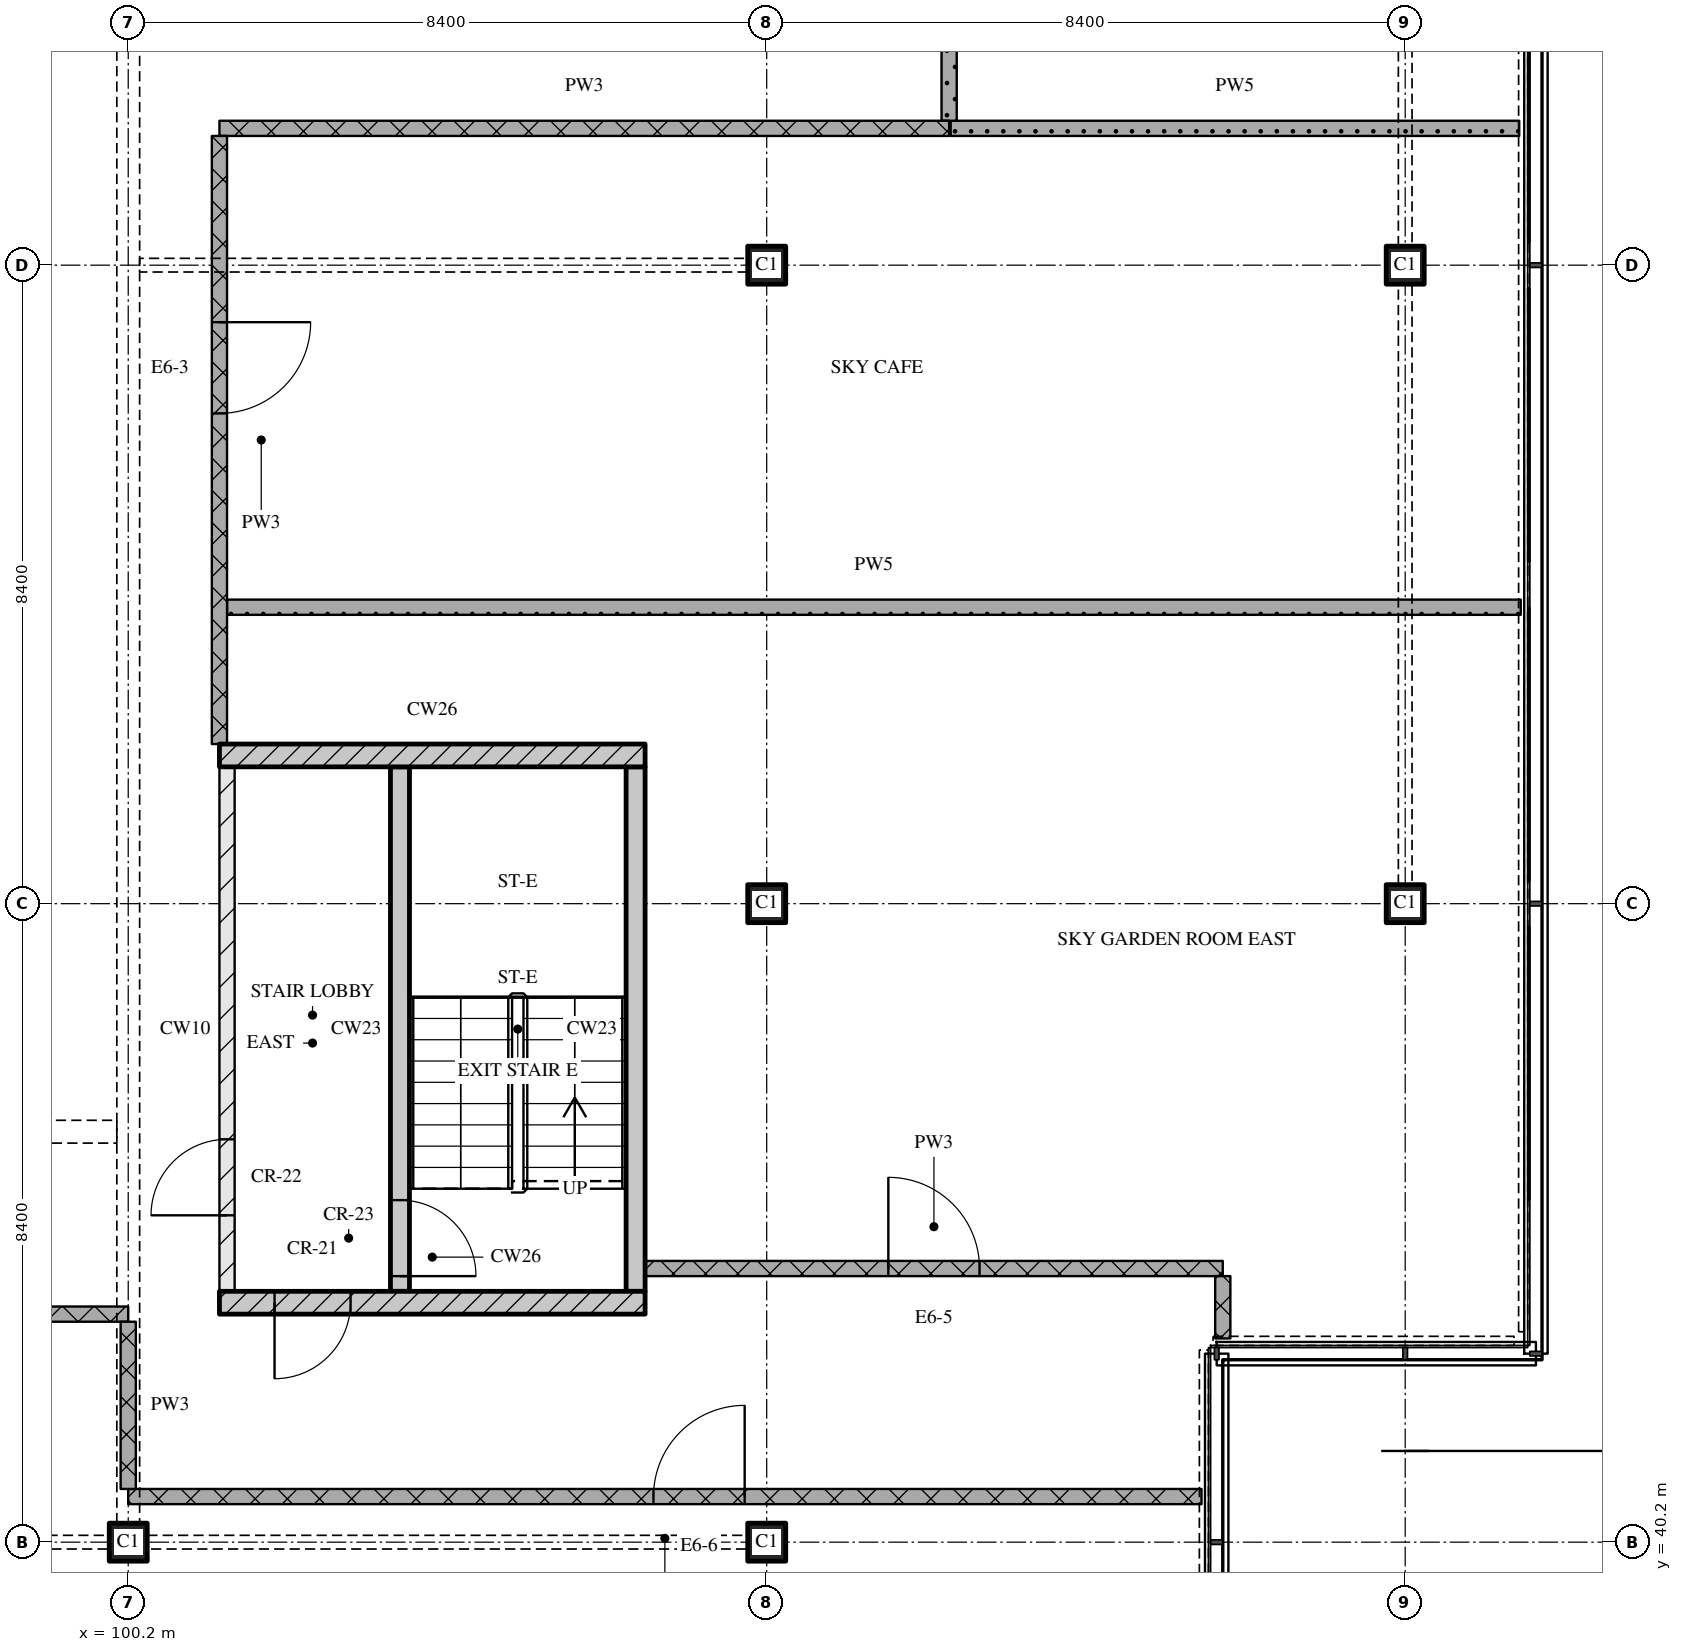
"""IFC4 building model, lengths in metres.
Left out: names, types, materials, properties, quantities, classifications, styles, units other than length and angle.
Written with IfcOpenShell. Run it as: python <this file> out.ifc"""

import sys

from ifc_helpers import new_model, si_unit, direction, frame, frame_2d, origin, origin_2d, place, context, subcontext, project, spatial, rectangle, extrude, element, fill, save


model = new_model("IFC4")
c1 = context("Model", 3, precision=1e-05, world=origin(), true_north=direction((0.0, 1.0)))
c2 = subcontext(c1, "Body", "Model", "MODEL_VIEW")
j1 = project(units=[si_unit("LENGTHUNIT", "METRE"), si_unit("PLANEANGLEUNIT", "RADIAN")], contexts=[c1])
p1 = place(None, origin())
s1 = spatial("IfcSite", under=j1, at=p1, CompositionType="ELEMENT")
p2 = place(p1, origin())
s2 = spatial("IfcBuilding", under=s1, at=p2, CompositionType="ELEMENT")
p3 = place(p2, frame((0.0, 0.0, 303.15)))
s3 = spatial("IfcBuildingStorey", under=s2, at=p3, CompositionType="ELEMENT", Elevation=303.15)
for number, where, z_axis, x_axis in (
    (1, (100.2, 40.2, 0.0), (0.0, 0.0, 1.0), (1.0, 0.0, 0.0)),
    (2, (108.6, 40.2, 0.0), (0.0, 0.0, 1.0), (1.0, 0.0, 0.0)),
    (3, (108.6, 48.6, 0.0), (0.0, 0.0, 1.0), (1.0, 0.0, 0.0)),
    (4, (108.6, 57.0, 0.0), (0.0, 0.0, 1.0), (1.0, 0.0, 0.0)),
    (5, (117.0, 48.6, 0.0), (0.0, 0.0, 1.0), (1.0, 0.0, 0.0)),
    (6, (117.0, 57.0, 0.0), (0.0, 0.0, 1.0), (1.0, 0.0, 0.0)),
):
    element("IfcColumn", number, at=place(p3, frame(where, z_axis=z_axis, x_axis=x_axis)), inside=s3, PredefinedType="COLUMN", context=c2, shape_type="SweptSolid", body=[
        extrude(rectangle(XDim=0.5, YDim=0.5, at=origin_2d()), origin(), (0.0, 0.0, 1.0), 3.6),
    ])
p4 = place(p3, frame((101.4, 43.35, 0.0), z_axis=(0.0, 0.0, 1.0), x_axis=(1.0, 0.0, 0.0)))
e7 = element("IfcWall", 7, at=p4, inside=s3, PredefinedType="SOLIDWALL", context=c2, shape_type="SweptSolid", body=[
    extrude(rectangle(XDim=5.6, YDim=0.3, at=frame_2d((2.8, 0.0))), origin(), (0.0, 0.0, 1.0), 3.32),
])
p5 = place(p4, frame((0.725, 0.0, 0.0)))
e8 = element("IfcOpeningElement", 8, at=p5, cuts=e7, PredefinedType="OPENING", context=c2, shape_type="SweptSolid", body=[
    extrude(rectangle(XDim=1.0, YDim=2.1, at=frame_2d((0.5, 1.05))), frame((0.0, 0.16, 0.0), z_axis=(0.0, -1.0, 0.0), x_axis=(1.0, 0.0, 0.0)), (0.0, 0.0, 1.0), 0.32),
])
p6 = place(p3, frame((101.5, 43.5, 0.0), z_axis=(0.0, 0.0, 1.0), x_axis=(0.0, 1.0, 0.0)))
e9 = element("IfcWall", 9, at=p6, inside=s3, PredefinedType="PARTITIONING", context=c2, shape_type="SweptSolid", body=[
    extrude(rectangle(XDim=6.9, YDim=0.2, at=frame_2d((3.45, 0.0))), origin(), (0.0, 0.0, 1.0), 3.32),
])
p7 = place(p6, frame((1.0, 0.0, 0.0)))
e10 = element("IfcOpeningElement", 10, at=p7, cuts=e9, PredefinedType="OPENING", context=c2, shape_type="SweptSolid", body=[
    extrude(rectangle(XDim=1.0, YDim=2.1, at=frame_2d((0.5, 1.05))), frame((0.0, 0.11, 0.0), z_axis=(0.0, -1.0, 0.0), x_axis=(1.0, 0.0, 0.0)), (0.0, 0.0, 1.0), 0.22),
])
p8 = place(p3, frame((103.775, 43.5, 0.0), z_axis=(0.0, 0.0, 1.0), x_axis=(0.0, 1.0, 0.0)))
e11 = element("IfcWall", 11, at=p8, inside=s3, PredefinedType="SOLIDWALL", context=c2, shape_type="SweptSolid", body=[
    extrude(rectangle(XDim=6.9, YDim=0.25, at=frame_2d((3.45, 0.0))), origin(), (0.0, 0.0, 1.0), 3.32),
])
p9 = place(p8, frame((0.2, 0.0, 0.0)))
e12 = element("IfcOpeningElement", 12, at=p9, cuts=e11, PredefinedType="OPENING", context=c2, shape_type="SweptSolid", body=[
    extrude(rectangle(XDim=1.0, YDim=2.1, at=frame_2d((0.5, 1.05))), frame((0.0, 0.135, 0.0), z_axis=(0.0, -1.0, 0.0), x_axis=(1.0, 0.0, 0.0)), (0.0, 0.0, 1.0), 0.27),
])
p10 = place(p3, frame((106.875, 43.5, 0.0), z_axis=(0.0, 0.0, 1.0), x_axis=(0.0, 1.0, 0.0)))
e13 = element("IfcWall", 13, at=p10, inside=s3, PredefinedType="SOLIDWALL", context=c2, shape_type="SweptSolid", body=[
    extrude(rectangle(XDim=6.9, YDim=0.25, at=frame_2d((3.45, 0.0))), origin(), (0.0, 0.0, 1.0), 3.32),
])
p11 = place(p3, frame((101.4, 50.55, 0.0), z_axis=(0.0, 0.0, 1.0), x_axis=(1.0, 0.0, 0.0)))
e14 = element("IfcWall", 14, at=p11, inside=s3, PredefinedType="SOLIDWALL", context=c2, shape_type="SweptSolid", body=[
    extrude(rectangle(XDim=5.6, YDim=0.3, at=frame_2d((2.8, 0.0))), origin(), (0.0, 0.0, 1.0), 3.32),
])
p12 = place(p3, frame((114.32, 40.8, 0.0), z_axis=(0.0, 0.0, 1.0), x_axis=(-1.0, 0.0, 0.0)))
e15 = element("IfcWall", 15, at=p12, inside=s3, PredefinedType="PARTITIONING", context=c2, shape_type="SweptSolid", body=[
    extrude(rectangle(XDim=14.12, YDim=0.2, at=frame_2d((7.06, 0.0))), origin(), (0.0, 0.0, 1.0), 3.32),
])
p13 = place(p12, frame((6.01, 0.0, 0.0)))
e16 = element("IfcOpeningElement", 16, at=p13, cuts=e15, PredefinedType="OPENING", context=c2, shape_type="SweptSolid", body=[
    extrude(rectangle(XDim=1.2, YDim=2.1, at=frame_2d((0.6, 1.05))), frame((0.0, 0.11, 0.0), z_axis=(0.0, -1.0, 0.0), x_axis=(1.0, 0.0, 0.0)), (0.0, 0.0, 1.0), 0.22),
])
p14 = place(p3, frame((100.2, 43.2, 0.0), z_axis=(0.0, 0.0, 1.0), x_axis=(-1.0, 0.0, 0.0)))
e17 = element("IfcWall", 17, at=p14, inside=s3, PredefinedType="PARTITIONING", context=c2, shape_type="SweptSolid", body=[
    extrude(rectangle(XDim=25.2, YDim=0.2, at=frame_2d((12.6, 0.0))), origin(), (0.0, 0.0, 1.0), 3.32),
])
p15 = place(p14, frame((12.0, 0.0, 0.0)))
e18 = element("IfcOpeningElement", 18, at=p15, cuts=e17, PredefinedType="OPENING", context=c2, shape_type="SweptSolid", body=[
    extrude(rectangle(XDim=1.2, YDim=2.1, at=frame_2d((0.6, 1.05))), frame((0.0, 0.11, 0.0), z_axis=(0.0, -1.0, 0.0), x_axis=(1.0, 0.0, 0.0)), (0.0, 0.0, 1.0), 0.22),
])
p16 = place(p3, frame((107.0, 43.8, 0.0), z_axis=(0.0, 0.0, 1.0), x_axis=(1.0, 0.0, 0.0)))
e19 = element("IfcWall", 19, at=p16, inside=s3, PredefinedType="PARTITIONING", context=c2, shape_type="SweptSolid", body=[
    extrude(rectangle(XDim=7.6, YDim=0.2, at=frame_2d((3.8, 0.0))), origin(), (0.0, 0.0, 1.0), 3.32),
])
p17 = place(p16, frame((3.2, 0.0, 0.0)))
e20 = element("IfcOpeningElement", 20, at=p17, cuts=e19, PredefinedType="OPENING", context=c2, shape_type="SweptSolid", body=[
    extrude(rectangle(XDim=1.2, YDim=2.1, at=frame_2d((0.6, 1.05))), frame((0.0, 0.11, 0.0), z_axis=(0.0, -1.0, 0.0), x_axis=(1.0, 0.0, 0.0)), (0.0, 0.0, 1.0), 0.22),
])
p18 = place(p3, frame((101.5, 52.5, 0.0), z_axis=(0.0, 0.0, 1.0), x_axis=(1.0, 0.0, 0.0)))
e21 = element("IfcWall", 21, at=p18, inside=s3, PredefinedType="PARTITIONING", context=c2, shape_type="SweptSolid", body=[
    extrude(rectangle(XDim=17.02, YDim=0.2, at=frame_2d((8.51, 0.0))), origin(), (0.0, 0.0, 1.0), 3.32),
])
p19 = place(p3, frame((101.4, 58.8, 0.0), z_axis=(0.0, 0.0, 1.0), x_axis=(1.0, 0.0, 0.0)))
e22 = element("IfcWall", 22, at=p19, inside=s3, PredefinedType="PARTITIONING", context=c2, shape_type="SweptSolid", body=[
    extrude(rectangle(XDim=9.6, YDim=0.2, at=frame_2d((4.8, 0.0))), origin(), (0.0, 0.0, 1.0), 3.32),
])
p20 = place(p3, frame((111.02, 58.8, 0.0), z_axis=(0.0, 0.0, 1.0), x_axis=(1.0, 0.0, 0.0)))
e23 = element("IfcWall", 23, at=p20, inside=s3, PredefinedType="PARTITIONING", context=c2, shape_type="SweptSolid", body=[
    extrude(rectangle(XDim=7.48, YDim=0.2, at=frame_2d((3.74, 0.0))), origin(), (0.0, 0.0, 1.0), 3.32),
])
p21 = place(p3, frame((100.2, 43.1, 0.0), z_axis=(0.0, 0.0, 1.0), x_axis=(0.0, -1.0, 0.0)))
e24 = element("IfcWall", 24, at=p21, inside=s3, PredefinedType="PARTITIONING", context=c2, shape_type="SweptSolid", body=[
    extrude(rectangle(XDim=2.2, YDim=0.2, at=frame_2d((1.1, 0.0))), origin(), (0.0, 0.0, 1.0), 2.53),
])
p22 = place(p3, frame((101.4, 58.7, 0.0), z_axis=(0.0, 0.0, 1.0), x_axis=(0.0, -1.0, 0.0)))
e25 = element("IfcWall", 25, at=p22, inside=s3, PredefinedType="PARTITIONING", context=c2, shape_type="SweptSolid", body=[
    extrude(rectangle(XDim=8.0, YDim=0.2, at=frame_2d((4.0, 0.0))), origin(), (0.0, 0.0, 1.0), 3.32),
])
p23 = place(p22, frame((2.45, 0.0, 0.0)))
e26 = element("IfcOpeningElement", 26, at=p23, cuts=e25, PredefinedType="OPENING", context=c2, shape_type="SweptSolid", body=[
    extrude(rectangle(XDim=1.2, YDim=2.1, at=frame_2d((0.6, 1.05))), frame((0.0, 0.11, 0.0), z_axis=(0.0, -1.0, 0.0), x_axis=(1.0, 0.0, 0.0)), (0.0, 0.0, 1.0), 0.22),
])
p24 = place(p3, frame((111.0, 61.1, 0.0), z_axis=(0.0, 0.0, 1.0), x_axis=(0.0, -1.0, 0.0)))
e27 = element("IfcWall", 27, at=p24, inside=s3, PredefinedType="PARTITIONING", context=c2, shape_type="SweptSolid", body=[
    extrude(rectangle(XDim=2.2, YDim=0.2, at=frame_2d((1.1, 0.0))), origin(), (0.0, 0.0, 1.0), 3.32),
])
p25 = place(p3, frame((114.6, 43.7, 0.0), z_axis=(0.0, 0.0, 1.0), x_axis=(0.0, -1.0, 0.0)))
e28 = element("IfcWall", 28, at=p25, inside=s3, PredefinedType="PARTITIONING", context=c2, shape_type="SweptSolid", body=[
    extrude(rectangle(XDim=0.82, YDim=0.2, at=frame_2d((0.41, 0.0))), origin(), (0.0, 0.0, 1.0), 3.32),
])
p26 = place(p5, origin())
e29 = element("IfcDoor", 29, at=p26, inside=s3, OperationType="SINGLE_SWING_RIGHT", PredefinedType="DOOR", context=c2, shape_type="SweptSolid", body=[
    extrude(rectangle(XDim=1.0, YDim=2.1, at=frame_2d((0.5, 1.05))), frame((0.0, 0.025, 0.0), z_axis=(0.0, -1.0, 0.0), x_axis=(1.0, 0.0, 0.0)), (0.0, 0.0, 1.0), 0.05),
])
fill(e8, e29)
p27 = place(p9, origin())
e30 = element("IfcDoor", 30, at=p27, inside=s3, OperationType="SINGLE_SWING_RIGHT", PredefinedType="DOOR", context=c2, shape_type="SweptSolid", body=[
    extrude(rectangle(XDim=1.0, YDim=2.1, at=frame_2d((0.5, 1.05))), frame((0.0, 0.025, 0.0), z_axis=(0.0, -1.0, 0.0), x_axis=(1.0, 0.0, 0.0)), (0.0, 0.0, 1.0), 0.05),
])
fill(e12, e30)
p28 = place(p7, origin())
e31 = element("IfcDoor", 31, at=p28, inside=s3, OperationType="SINGLE_SWING_LEFT", PredefinedType="DOOR", context=c2, shape_type="SweptSolid", body=[
    extrude(rectangle(XDim=1.0, YDim=2.1, at=frame_2d((0.5, 1.05))), frame((0.0, 0.025, 0.0), z_axis=(0.0, -1.0, 0.0), x_axis=(1.0, 0.0, 0.0)), (0.0, 0.0, 1.0), 0.05),
])
fill(e10, e31)
p29 = place(p13, origin())
e32 = element("IfcDoor", 32, at=p29, inside=s3, OperationType="SINGLE_SWING_RIGHT", PredefinedType="DOOR", context=c2, shape_type="SweptSolid", body=[
    extrude(rectangle(XDim=1.2, YDim=2.1, at=frame_2d((0.6, 1.05))), frame((0.0, 0.025, 0.0), z_axis=(0.0, -1.0, 0.0), x_axis=(1.0, 0.0, 0.0)), (0.0, 0.0, 1.0), 0.05),
])
fill(e16, e32)
p30 = place(p17, origin())
e33 = element("IfcDoor", 33, at=p30, inside=s3, OperationType="SINGLE_SWING_LEFT", PredefinedType="DOOR", context=c2, shape_type="SweptSolid", body=[
    extrude(rectangle(XDim=1.2, YDim=2.1, at=frame_2d((0.6, 1.05))), frame((0.0, 0.025, 0.0), z_axis=(0.0, -1.0, 0.0), x_axis=(1.0, 0.0, 0.0)), (0.0, 0.0, 1.0), 0.05),
])
fill(e20, e33)
p31 = place(p23, origin())
e34 = element("IfcDoor", 34, at=p31, inside=s3, OperationType="SINGLE_SWING_LEFT", PredefinedType="DOOR", context=c2, shape_type="SweptSolid", body=[
    extrude(rectangle(XDim=1.2, YDim=2.1, at=frame_2d((0.6, 1.05))), frame((0.0, 0.025, 0.0), z_axis=(0.0, -1.0, 0.0), x_axis=(1.0, 0.0, 0.0)), (0.0, 0.0, 1.0), 0.05),
])
fill(e26, e34)
save(model, sys.argv[1])
